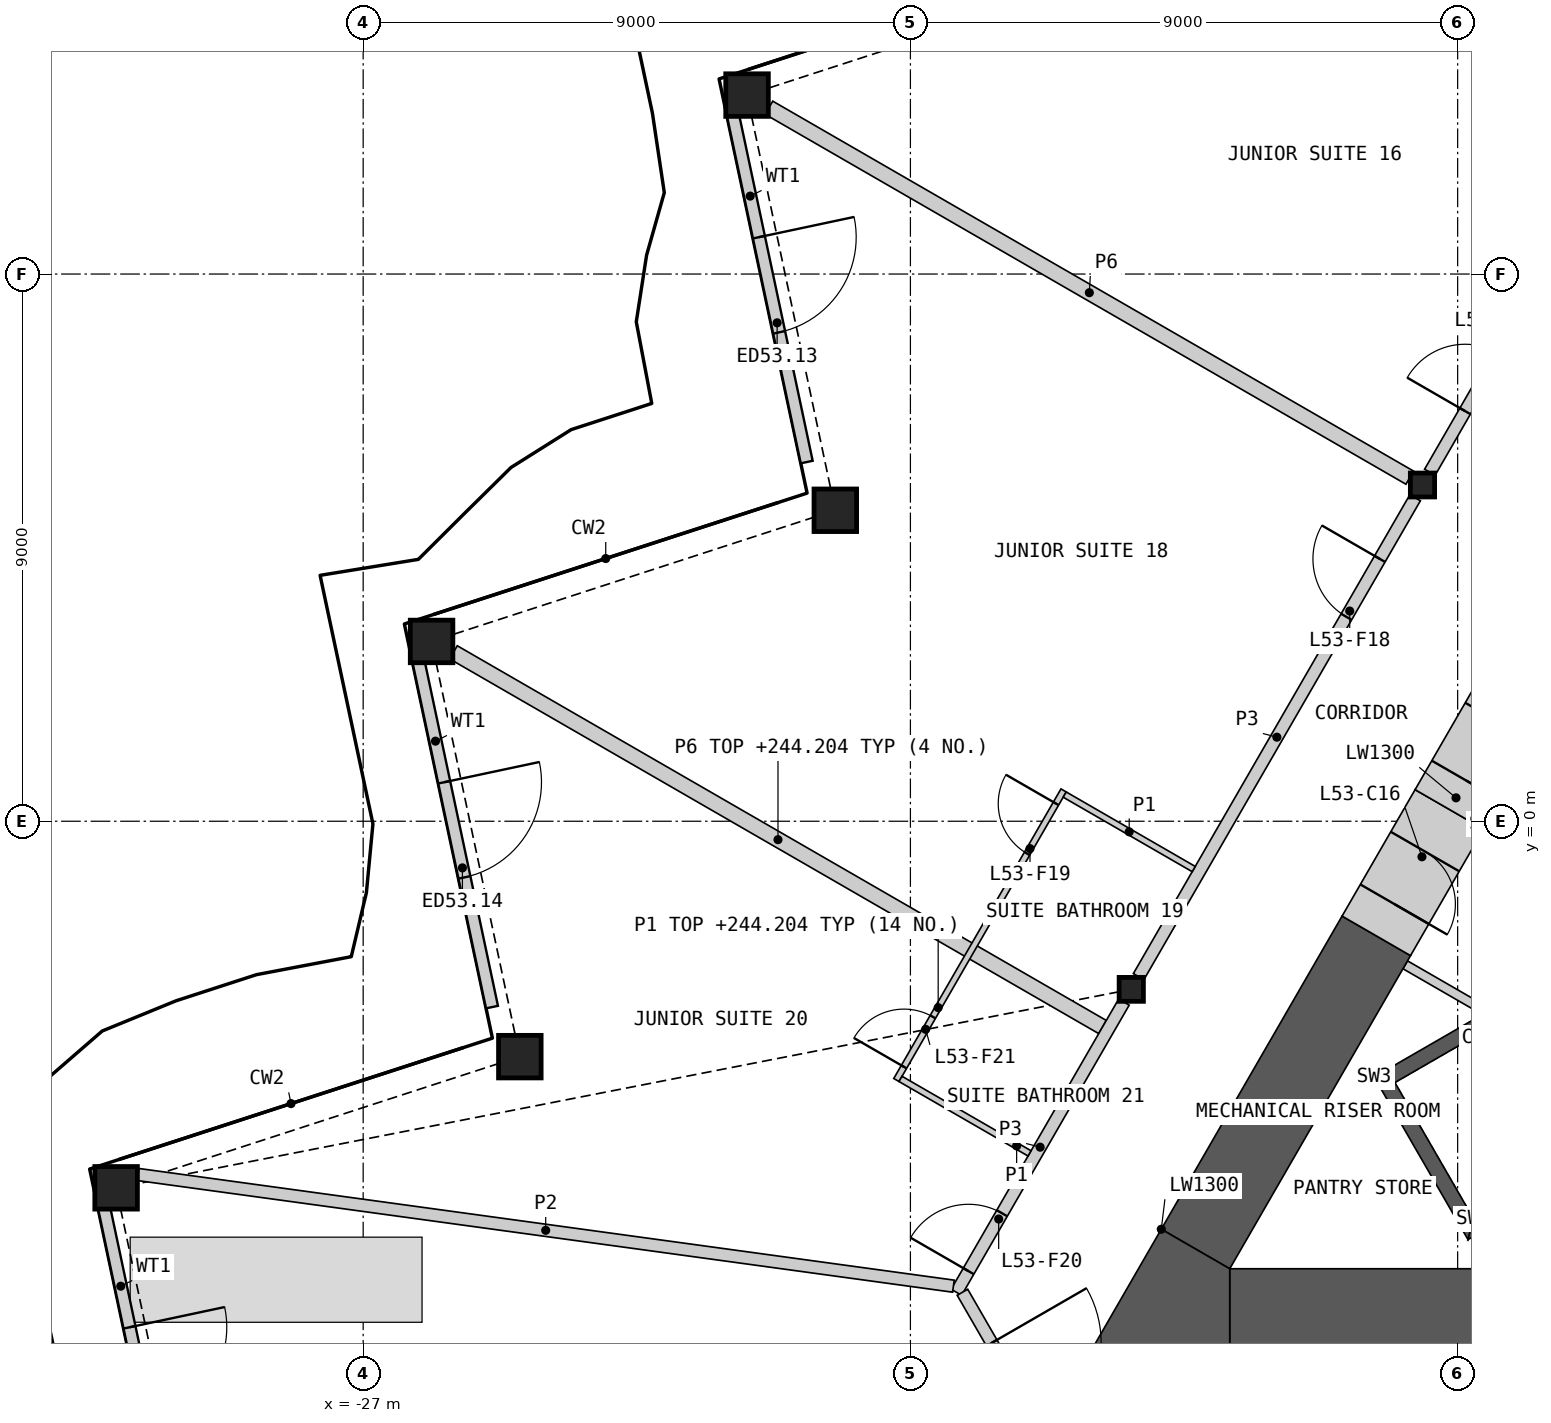
"""IFC4 building model, lengths in metres.
Left out: names, types, materials, properties, quantities, classifications, styles, units other than length and angle.
Written with IfcOpenShell. Run it as: python <this file> out.ifc"""

import sys

from ifc_helpers import new_model, si_unit, direction, frame, frame_2d, origin, origin_2d, place, context, subcontext, project, spatial, polyline, rectangle, hollow_rectangle, i_section, outline, extrude, element, fill, save


model = new_model("IFC4")
c1 = context("Model", 3, precision=1e-05, world=origin(), true_north=direction((0.0, 1.0)))
c2 = subcontext(c1, "Body", "Model", "MODEL_VIEW")
j1 = project(units=[si_unit("LENGTHUNIT", "METRE"), si_unit("PLANEANGLEUNIT", "RADIAN")], contexts=[c1])
p1 = place(None, origin())
s1 = spatial("IfcSite", under=j1, at=p1, CompositionType="ELEMENT")
p2 = place(p1, origin())
s2 = spatial("IfcBuilding", under=s1, at=p2, CompositionType="ELEMENT")
p3 = place(p2, frame((0.0, 0.0, 241.8)))
s3 = spatial("IfcBuildingStorey", under=s2, at=p3, CompositionType="ELEMENT", Elevation=241.8)
for number, where, z_axis, x_axis in (
    (1, (-20.687, 11.943, 0.0), (0.0, 0.0, 1.0), (1.0, 0.0, 0.0)),
    (2, (-19.235, 5.115, 0.0), (0.0, 0.0, 1.0), (1.0, 0.0, 0.0)),
    (3, (-25.875, 2.957, 0.0), (0.0, 0.0, 1.0), (1.0, 0.0, 0.0)),
    (4, (-24.423, -3.872, 0.0), (0.0, 0.0, 1.0), (1.0, 0.0, 0.0)),
    (5, (-31.063, -6.029, 0.0), (0.0, 0.0, 1.0), (1.0, 0.0, 0.0)),
):
    element("IfcColumn", number, at=place(p3, frame(where, z_axis=z_axis, x_axis=x_axis)), inside=s3, PredefinedType="COLUMN", context=c2, shape_type="SweptSolid", body=[
        extrude(hollow_rectangle(XDim=0.7, YDim=0.7, WallThickness=0.045, at=origin_2d()), origin(), (0.0, 0.0, 1.0), 3.6),
    ])
for number, where, z_axis, x_axis in (
    (6, (-9.578, 5.53, 0.0), (0.0, 0.0, 1.0), (1.0, 0.0, 0.0)),
    (7, (-14.368, -2.765, 0.0), (0.0, 0.0, 1.0), (1.0, 0.0, 0.0)),
):
    element("IfcColumn", number, at=place(p3, frame(where, z_axis=z_axis, x_axis=x_axis)), inside=s3, PredefinedType="COLUMN", context=c2, shape_type="SweptSolid", body=[
        extrude(i_section(OverallWidth=0.399, OverallDepth=0.393, WebThickness=0.023, FlangeThickness=0.037, at=origin_2d()), origin(), (0.0, 0.0, 1.0), 3.6),
    ])
p4 = place(p3, frame((-20.945, 11.74, 0.0), z_axis=(0.0, 0.0, 1.0), x_axis=(0.207920947907, -0.978145633033, 0.0)))
e8 = element("IfcWall", 8, at=p4, inside=s3, PredefinedType="SOLIDWALL", context=c2, shape_type="SweptSolid", body=[
    extrude(rectangle(XDim=5.963, YDim=0.2, at=frame_2d((2.981, 0.0))), origin(), (0.0, 0.0, 1.0), 2.701),
])
p5 = place(p4, frame((2.181, 0.0, 0.0)))
e9 = element("IfcOpeningElement", 9, at=p5, cuts=e8, PredefinedType="OPENING", context=c2, shape_type="SweptSolid", body=[
    extrude(rectangle(XDim=1.6, YDim=2.4, at=frame_2d((0.8, 1.2))), frame((0.0, 0.11, 0.0), z_axis=(0.0, -1.0, 0.0), x_axis=(1.0, 0.0, 0.0)), (0.0, 0.0, 1.0), 0.22),
])
p6 = place(p3, frame((-26.121, 2.775, 0.0), z_axis=(0.0, 0.0, 1.0), x_axis=(0.207881772083, -0.978153959679, 0.0)))
e10 = element("IfcWall", 10, at=p6, inside=s3, PredefinedType="SOLIDWALL", context=c2, shape_type="SweptSolid", body=[
    extrude(rectangle(XDim=5.963, YDim=0.2, at=frame_2d((2.981, 0.0))), origin(), (0.0, 0.0, 1.0), 2.701),
])
p7 = place(p6, frame((2.181, 0.0, 0.0)))
e11 = element("IfcOpeningElement", 11, at=p7, cuts=e10, PredefinedType="OPENING", context=c2, shape_type="SweptSolid", body=[
    extrude(rectangle(XDim=1.6, YDim=2.4, at=frame_2d((0.8, 1.2))), frame((0.0, 0.11, 0.0), z_axis=(0.0, -1.0, 0.0), x_axis=(1.0, 0.0, 0.0)), (0.0, 0.0, 1.0), 0.22),
])
p8 = place(p3, frame((-31.296, -6.189, 0.0), z_axis=(0.0, 0.0, 1.0), x_axis=(0.207920947907, -0.978145633033, 0.0)))
e12 = element("IfcWall", 12, at=p8, inside=s3, PredefinedType="SOLIDWALL", context=c2, shape_type="SweptSolid", body=[
    extrude(rectangle(XDim=5.963, YDim=0.2, at=frame_2d((2.981, 0.0))), origin(), (0.0, 0.0, 1.0), 2.701),
])
p9 = place(p8, frame((2.181, 0.0, 0.0)))
e13 = element("IfcOpeningElement", 13, at=p9, cuts=e12, PredefinedType="OPENING", context=c2, shape_type="SweptSolid", body=[
    extrude(rectangle(XDim=1.6, YDim=2.4, at=frame_2d((0.8, 1.2))), frame((0.0, 0.11, 0.0), z_axis=(0.0, -1.0, 0.0), x_axis=(1.0, 0.0, 0.0)), (0.0, 0.0, 1.0), 0.22),
])
p10 = place(p3, origin())
e14 = element("IfcWall", 14, at=p10, inside=s3, PredefinedType="SHEAR", context=c2, shape_type="SweptSolid", body=[
    extrude(outline(polyline([(-5.307, -1.281), (-10.374, -4.206), (-10.032, -4.298), (-5.182, -1.498), (-5.307, -1.281)])), origin(), (0.0, 0.0, 1.0), 3.25),
])
p11 = place(p3, origin())
e15 = element("IfcWall", 15, at=p11, inside=s3, PredefinedType="SHEAR", context=c2, shape_type="SweptSolid", body=[
    extrude(outline(polyline([(-10.374, -4.206), (-8.83, -6.881), (-8.738, -6.539), (-10.032, -4.298), (-10.374, -4.206)])), origin(), (0.0, 0.0, 1.0), 3.25),
])
p12 = place(p3, origin())
e16 = element("IfcWall", 16, at=p12, inside=s3, PredefinedType="SHEAR", context=c2, shape_type="SweptSolid", body=[
    extrude(outline(polyline([(-8.738, -6.539), (-8.83, -6.881), (-3.763, -3.956), (-3.888, -3.739), (-8.738, -6.539)])), origin(), (0.0, 0.0, 1.0), 3.25),
])
p13 = place(p3, frame((-9.862, -2.361, 0.0), z_axis=(0.0, 0.0, 1.0), x_axis=(0.865990094875, -0.500061151839, 0.0)))
e17 = element("IfcWall", 17, at=p13, inside=s3, PredefinedType="PARTITIONING", context=c2, shape_type="SweptSolid", body=[
    extrude(rectangle(XDim=1.56, YDim=0.15, at=frame_2d((0.78, 0.0))), origin(), (0.0, 0.0, 1.0), 3.25),
])
p14 = place(p3, frame((-12.748, -8.01, 0.0), z_axis=(0.0, 0.0, 1.0), x_axis=(1.0, 0.0, 0.0)))
e18 = element("IfcWall", 18, at=p14, inside=s3, PredefinedType="SHEAR", context=c2, shape_type="SweptSolid", body=[
    extrude(rectangle(XDim=4.26, YDim=1.3, at=frame_2d((2.13, 0.0))), origin(), (0.0, 0.0, 1.0), 3.25),
])
p15 = place(p3, frame((-10.338, -1.885, 0.0), z_axis=(0.0, 0.0, 1.0), x_axis=(-0.499975944838, -0.866039291593, 0.0)))
e19 = element("IfcWall", 19, at=p15, inside=s3, PredefinedType="SHEAR", context=c2, shape_type="SweptSolid", body=[
    extrude(rectangle(XDim=5.947, YDim=1.3, at=frame_2d((2.974, 0.0))), origin(), (0.0, 0.0, 1.0), 3.25),
])
p16 = place(p3, origin())
e20 = element("IfcWall", 20, at=p16, inside=s3, PredefinedType="SHEAR", context=c2, shape_type="SweptSolid", body=[
    extrude(outline(polyline([(-13.874, -6.71), (-12.748, -7.36), (-12.748, -8.66), (-15.0, -8.66), (-13.874, -6.71)])), origin(), (0.0, 0.0, 1.0), 3.25),
])
p17 = place(p3, frame((-9.137, 0.195, 0.0), z_axis=(0.0, 0.0, 1.0), x_axis=(-0.500009943768, -0.866019662671, 0.0)))
e21 = element("IfcWall", 21, at=p17, inside=s3, PredefinedType="SHEAR", context=c2, shape_type="SweptSolid", body=[
    extrude(rectangle(XDim=2.401, YDim=1.3, at=frame_2d((1.201, 0.0))), origin(), (0.0, 0.0, 1.0), 3.25),
])
p18 = place(p17, frame((0.8, 0.0, 0.0)))
e22 = element("IfcOpeningElement", 22, at=p18, cuts=e21, PredefinedType="OPENING", context=c2, shape_type="SweptSolid", body=[
    extrude(rectangle(XDim=1.0, YDim=2.1, at=frame_2d((0.5, 1.05))), frame((0.0, 0.66, 0.0), z_axis=(0.0, -1.0, 0.0), x_axis=(1.0, 0.0, 0.0)), (0.0, 0.0, 1.0), 1.32),
])
p19 = place(p3, frame((-8.037, 2.1, 0.0), z_axis=(0.0, 0.0, 1.0), x_axis=(-0.50002983664, -0.866008176907, 0.0)))
e23 = element("IfcWall", 23, at=p19, inside=s3, PredefinedType="SHEAR", context=c2, shape_type="SweptSolid", body=[
    extrude(rectangle(XDim=2.2, YDim=1.3, at=frame_2d((1.1, 0.0))), origin(), (0.0, 0.0, 1.0), 3.25),
])
p20 = place(p19, frame((0.55, 0.0, 0.0)))
e24 = element("IfcOpeningElement", 24, at=p20, cuts=e23, PredefinedType="OPENING", context=c2, shape_type="SweptSolid", body=[
    extrude(rectangle(XDim=1.1, YDim=2.1, at=frame_2d((0.55, 1.05))), frame((0.0, 0.66, 0.0), z_axis=(0.0, -1.0, 0.0), x_axis=(1.0, 0.0, 0.0)), (0.0, 0.0, 1.0), 1.32),
])
p21 = place(p3, frame((-25.515, 2.778, 0.0), z_axis=(0.0, 0.0, 1.0), x_axis=(0.866019666699, -0.500009936792, 0.0)))
e25 = element("IfcWall", 25, at=p21, inside=s3, PredefinedType="PARTITIONING", context=c2, shape_type="SweptSolid", body=[
    extrude(rectangle(XDim=12.325, YDim=0.25, at=frame_2d((6.163, 0.0))), origin(), (0.0, 0.0, 1.0), 2.404),
])
p22 = place(p3, frame((-20.327, 11.736, 0.0), z_axis=(0.0, 0.0, 1.0), x_axis=(0.866024549986, -0.50000147882, 0.0)))
e26 = element("IfcWall", 26, at=p22, inside=s3, PredefinedType="PARTITIONING", context=c2, shape_type="SweptSolid", body=[
    extrude(rectangle(XDim=12.169, YDim=0.25, at=frame_2d((6.084, 0.0))), origin(), (0.0, 0.0, 1.0), 2.404),
])
p23 = place(p3, frame((-14.247, -2.556, 0.0), z_axis=(0.0, 0.0, 1.0), x_axis=(0.49998193945, 0.866035830797, 0.0)))
e27 = element("IfcWall", 27, at=p23, inside=s3, PredefinedType="PARTITIONING", context=c2, shape_type="SweptSolid", body=[
    extrude(rectangle(XDim=9.094, YDim=0.2, at=frame_2d((4.547, 0.0))), origin(), (0.0, 0.0, 1.0), 3.25),
])
p24 = place(p23, frame((6.833, 0.0, 0.0)))
e28 = element("IfcOpeningElement", 28, at=p24, cuts=e27, PredefinedType="OPENING", context=c2, shape_type="SweptSolid", body=[
    extrude(rectangle(XDim=1.1, YDim=2.1, at=frame_2d((0.55, 1.05))), frame((0.0, 0.11, 0.0), z_axis=(0.0, -1.0, 0.0), x_axis=(1.0, 0.0, 0.0)), (0.0, 0.0, 1.0), 0.22),
])
p25 = place(p3, frame((-9.458, 5.74, 0.0), z_axis=(0.0, 0.0, 1.0), x_axis=(0.50000207303, 0.866024206917, 0.0)))
e29 = element("IfcWall", 29, at=p25, inside=s3, PredefinedType="PARTITIONING", context=c2, shape_type="SweptSolid", body=[
    extrude(rectangle(XDim=9.095, YDim=0.2, at=frame_2d((4.547, 0.0))), origin(), (0.0, 0.0, 1.0), 3.25),
])
p26 = place(p25, frame((1.162, 0.0, 0.0)))
e30 = element("IfcOpeningElement", 30, at=p26, cuts=e29, PredefinedType="OPENING", context=c2, shape_type="SweptSolid", body=[
    extrude(rectangle(XDim=1.1, YDim=2.1, at=frame_2d((0.55, 1.05))), frame((0.0, 0.11, 0.0), z_axis=(0.0, -1.0, 0.0), x_axis=(1.0, 0.0, 0.0)), (0.0, 0.0, 1.0), 0.22),
])
p27 = place(p3, frame((-17.244, -7.747, 0.0), z_axis=(0.0, 0.0, 1.0), x_axis=(0.500017753321, 0.866015153657, 0.0)))
e31 = element("IfcWall", 31, at=p27, inside=s3, PredefinedType="PARTITIONING", context=c2, shape_type="SweptSolid", body=[
    extrude(rectangle(XDim=5.51, YDim=0.2, at=frame_2d((2.755, 0.0))), origin(), (0.0, 0.0, 1.0), 3.25),
])
p28 = place(p27, frame((0.401, 0.0, 0.0)))
e32 = element("IfcOpeningElement", 32, at=p28, cuts=e31, PredefinedType="OPENING", context=c2, shape_type="SweptSolid", body=[
    extrude(rectangle(XDim=1.1, YDim=2.1, at=frame_2d((0.55, 1.05))), frame((0.0, 0.11, 0.0), z_axis=(0.0, -1.0, 0.0), x_axis=(1.0, 0.0, 0.0)), (0.0, 0.0, 1.0), 0.22),
])
p29 = place(p3, frame((-17.144, -7.747, 0.0), z_axis=(0.0, 0.0, 1.0), x_axis=(0.499961815444, -0.866047448526, 0.0)))
e33 = element("IfcWall", 33, at=p29, inside=s3, PredefinedType="PARTITIONING", context=c2, shape_type="SweptSolid", body=[
    extrude(rectangle(XDim=3.826, YDim=0.2, at=frame_2d((1.913, 0.0))), origin(), (0.0, 0.0, 1.0), 3.25),
])
p30 = place(p29, frame((0.962, 0.0, 0.0)))
e34 = element("IfcOpeningElement", 34, at=p30, cuts=e33, PredefinedType="OPENING", context=c2, shape_type="SweptSolid", body=[
    extrude(rectangle(XDim=1.8, YDim=2.1, at=frame_2d((0.9, 1.05))), frame((0.0, 0.11, 0.0), z_axis=(0.0, -1.0, 0.0), x_axis=(1.0, 0.0, 0.0)), (0.0, 0.0, 1.0), 0.22),
])
p31 = place(p3, frame((-30.703, -5.81, 0.0), z_axis=(0.0, 0.0, 1.0), x_axis=(0.99075075074, -0.135694325259, 0.0)))
e35 = element("IfcWall", 35, at=p31, inside=s3, PredefinedType="PARTITIONING", context=c2, shape_type="SweptSolid", body=[
    extrude(rectangle(XDim=13.535, YDim=0.2, at=frame_2d((6.768, 0.0))), origin(), (0.0, 0.0, 1.0), 2.404),
])
p32 = place(p3, frame((-18.231, -4.256, 0.0), z_axis=(0.0, 0.0, 1.0), x_axis=(0.500015767406, 0.866016300277, 0.0)))
e36 = element("IfcWall", 36, at=p32, inside=s3, PredefinedType="PARTITIONING", context=c2, shape_type="SweptSolid", body=[
    extrude(rectangle(XDim=5.5, YDim=0.1, at=frame_2d((2.75, 0.0))), origin(), (0.0, 0.0, 1.0), 2.404),
])
p33 = place(p32, frame((4.3, 0.0, 0.0)))
e37 = element("IfcOpeningElement", 37, at=p33, cuts=e36, PredefinedType="OPENING", context=c2, shape_type="SweptSolid", body=[
    extrude(rectangle(XDim=0.95, YDim=2.1, at=frame_2d((0.475, 1.05))), frame((0.0, 0.06, 0.0), z_axis=(0.0, -1.0, 0.0), x_axis=(1.0, 0.0, 0.0)), (0.0, 0.0, 1.0), 0.12),
])
p34 = place(p32, frame((0.25, 0.0, 0.0)))
e38 = element("IfcOpeningElement", 38, at=p34, cuts=e36, PredefinedType="OPENING", context=c2, shape_type="SweptSolid", body=[
    extrude(rectangle(XDim=0.95, YDim=2.1, at=frame_2d((0.475, 1.05))), frame((0.0, 0.06, 0.0), z_axis=(0.0, -1.0, 0.0), x_axis=(1.0, 0.0, 0.0)), (0.0, 0.0, 1.0), 0.12),
])
p35 = place(p3, frame((-15.462, 0.439, 0.0), z_axis=(0.0, 0.0, 1.0), x_axis=(0.865989751695, -0.500061746146, 0.0)))
e39 = element("IfcWall", 39, at=p35, inside=s3, PredefinedType="PARTITIONING", context=c2, shape_type="SweptSolid", body=[
    extrude(rectangle(XDim=2.45, YDim=0.1, at=frame_2d((1.225, 0.0))), origin(), (0.0, 0.0, 1.0), 2.404),
])
p36 = place(p3, frame((-18.163, -4.238, 0.0), z_axis=(0.0, 0.0, 1.0), x_axis=(0.866014668023, -0.500018594424, 0.0)))
e40 = element("IfcWall", 40, at=p36, inside=s3, PredefinedType="PARTITIONING", context=c2, shape_type="SweptSolid", body=[
    extrude(rectangle(XDim=2.45, YDim=0.1, at=frame_2d((1.225, 0.0))), origin(), (0.0, 0.0, 1.0), 2.404),
])
p37 = place(p5, origin())
e41 = element("IfcDoor", 41, at=p37, inside=s3, OperationType="DOUBLE_DOOR_SINGLE_SWING", PredefinedType="DOOR", context=c2, shape_type="SweptSolid", body=[
    extrude(rectangle(XDim=1.6, YDim=2.4, at=frame_2d((0.8, 1.2))), frame((0.0, 0.025, 0.0), z_axis=(0.0, -1.0, 0.0), x_axis=(1.0, 0.0, 0.0)), (0.0, 0.0, 1.0), 0.05),
])
fill(e9, e41)
p38 = place(p7, origin())
e42 = element("IfcDoor", 42, at=p38, inside=s3, OperationType="DOUBLE_DOOR_SINGLE_SWING", PredefinedType="DOOR", context=c2, shape_type="SweptSolid", body=[
    extrude(rectangle(XDim=1.6, YDim=2.4, at=frame_2d((0.8, 1.2))), frame((0.0, 0.025, 0.0), z_axis=(0.0, -1.0, 0.0), x_axis=(1.0, 0.0, 0.0)), (0.0, 0.0, 1.0), 0.05),
])
fill(e11, e42)
p39 = place(p9, origin())
e43 = element("IfcDoor", 43, at=p39, inside=s3, OperationType="DOUBLE_DOOR_SINGLE_SWING", PredefinedType="DOOR", context=c2, shape_type="SweptSolid", body=[
    extrude(rectangle(XDim=1.6, YDim=2.4, at=frame_2d((0.8, 1.2))), frame((0.0, 0.025, 0.0), z_axis=(0.0, -1.0, 0.0), x_axis=(1.0, 0.0, 0.0)), (0.0, 0.0, 1.0), 0.05),
])
fill(e13, e43)
p40 = place(p18, origin())
e44 = element("IfcDoor", 44, at=p40, inside=s3, OperationType="SINGLE_SWING_RIGHT", PredefinedType="DOOR", context=c2, shape_type="SweptSolid", body=[
    extrude(rectangle(XDim=1.0, YDim=2.1, at=frame_2d((0.5, 1.05))), frame((0.0, 0.405, 0.0), z_axis=(0.0, -1.0, 0.0), x_axis=(1.0, 0.0, 0.0)), (0.0, 0.0, 1.0), 0.05),
])
fill(e22, e44)
p41 = place(p26, origin())
e45 = element("IfcDoor", 45, at=p41, inside=s3, OperationType="SINGLE_SWING_LEFT", PredefinedType="DOOR", context=c2, shape_type="SweptSolid", body=[
    extrude(rectangle(XDim=1.1, YDim=2.1, at=frame_2d((0.55, 1.05))), frame((0.0, 0.025, 0.0), z_axis=(0.0, -1.0, 0.0), x_axis=(1.0, 0.0, 0.0)), (0.0, 0.0, 1.0), 0.05),
])
fill(e30, e45)
p42 = place(p24, origin())
e46 = element("IfcDoor", 46, at=p42, inside=s3, OperationType="SINGLE_SWING_RIGHT", PredefinedType="DOOR", context=c2, shape_type="SweptSolid", body=[
    extrude(rectangle(XDim=1.1, YDim=2.1, at=frame_2d((0.55, 1.05))), frame((0.0, 0.025, 0.0), z_axis=(0.0, -1.0, 0.0), x_axis=(1.0, 0.0, 0.0)), (0.0, 0.0, 1.0), 0.05),
])
fill(e28, e46)
p43 = place(p33, origin())
e47 = element("IfcDoor", 47, at=p43, inside=s3, OperationType="SINGLE_SWING_RIGHT", PredefinedType="DOOR", context=c2, shape_type="SweptSolid", body=[
    extrude(rectangle(XDim=0.95, YDim=2.1, at=frame_2d((0.475, 1.05))), frame((0.0, 0.025, 0.0), z_axis=(0.0, -1.0, 0.0), x_axis=(1.0, 0.0, 0.0)), (0.0, 0.0, 1.0), 0.05),
])
fill(e37, e47)
p44 = place(p28, origin())
e48 = element("IfcDoor", 48, at=p44, inside=s3, OperationType="SINGLE_SWING_LEFT", PredefinedType="DOOR", context=c2, shape_type="SweptSolid", body=[
    extrude(rectangle(XDim=1.1, YDim=2.1, at=frame_2d((0.55, 1.05))), frame((0.0, 0.025, 0.0), z_axis=(0.0, -1.0, 0.0), x_axis=(1.0, 0.0, 0.0)), (0.0, 0.0, 1.0), 0.05),
])
fill(e32, e48)
p45 = place(p34, origin())
e49 = element("IfcDoor", 49, at=p45, inside=s3, OperationType="SINGLE_SWING_LEFT", PredefinedType="DOOR", context=c2, shape_type="SweptSolid", body=[
    extrude(rectangle(XDim=0.95, YDim=2.1, at=frame_2d((0.475, 1.05))), frame((0.0, 0.025, 0.0), z_axis=(0.0, -1.0, 0.0), x_axis=(1.0, 0.0, 0.0)), (0.0, 0.0, 1.0), 0.05),
])
fill(e38, e49)
p46 = place(p30, origin())
e50 = element("IfcDoor", 50, at=p46, inside=s3, OperationType="DOUBLE_DOOR_SINGLE_SWING", PredefinedType="DOOR", context=c2, shape_type="SweptSolid", body=[
    extrude(rectangle(XDim=1.8, YDim=2.1, at=frame_2d((0.9, 1.05))), frame((0.0, 0.025, 0.0), z_axis=(0.0, -1.0, 0.0), x_axis=(1.0, 0.0, 0.0)), (0.0, 0.0, 1.0), 0.05),
])
fill(e34, e50)
save(model, sys.argv[1])
